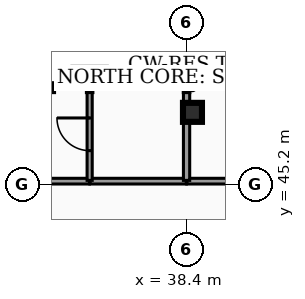
"""IFC4 building model, lengths in metres.
Left out: names, types, materials, properties, quantities, classifications, styles, units other than length and angle.
Written with IfcOpenShell. Run it as: python <this file> out.ifc"""

import sys

from ifc_helpers import new_model, si_unit, direction, frame, frame_2d, origin, origin_2d, place, context, subcontext, project, spatial, rectangle, hollow_rectangle, extrude, element, fill, save


model = new_model("IFC4")
c1 = context("Model", 3, precision=1e-05, world=origin(), true_north=direction((0.0, 1.0)))
c2 = subcontext(c1, "Body", "Model", "MODEL_VIEW")
j1 = project(units=[si_unit("LENGTHUNIT", "METRE"), si_unit("PLANEANGLEUNIT", "RADIAN")], contexts=[c1])
p1 = place(None, origin())
s1 = spatial("IfcSite", under=j1, at=p1, CompositionType="ELEMENT")
p2 = place(p1, origin())
s2 = spatial("IfcBuilding", under=s1, at=p2, CompositionType="ELEMENT")
p3 = place(p2, frame((0.0, 0.0, 272.0)))
s3 = spatial("IfcBuildingStorey", under=s2, at=p3, CompositionType="ELEMENT", Elevation=272.0)
p4 = place(p3, frame((38.555, 47.1, 0.0), z_axis=(0.0, 0.0, 1.0), x_axis=(1.0, 0.0, 0.0)))
e1 = element("IfcColumn", 1, at=p4, inside=s3, PredefinedType="COLUMN", context=c2, shape_type="SweptSolid", body=[
    extrude(hollow_rectangle(XDim=0.5, YDim=0.5, WallThickness=0.025, at=origin_2d()), origin(), (0.0, 0.0, 1.0), 3.18),
])
p5 = place(p3, frame((26.57, 45.29, 0.0), z_axis=(0.0, 0.0, 1.0), x_axis=(1.0, 0.0, 0.0)))
e2 = element("IfcWall", 2, at=p5, inside=s3, PredefinedType="PARTITIONING", context=c2, shape_type="SweptSolid", body=[
    extrude(rectangle(XDim=9.275, YDim=0.15, at=frame_2d((4.637, 0.0))), origin(), (0.0, 0.0, 1.0), 2.235),
])
for number, where, z_axis, x_axis in (
    (3, (35.855, 45.29, 0.0), (0.0, 0.0, 1.0), (1.0, 0.0, 0.0)),
    (4, (38.405, 45.29, 0.0), (0.0, 0.0, 1.0), (1.0, 0.0, 0.0)),
):
    element("IfcWall", number, at=place(p3, frame(where, z_axis=z_axis, x_axis=x_axis)), inside=s3, PredefinedType="PARTITIONING", context=c2, shape_type="SweptSolid", body=[
        extrude(rectangle(XDim=2.54, YDim=0.15, at=frame_2d((1.27, 0.0))), origin(), (0.0, 0.0, 1.0), 2.235),
    ])
p6 = place(p3, frame((35.85, 45.31, 0.0), z_axis=(0.0, 0.0, 1.0), x_axis=(0.0, 1.0, 0.0)))
e5 = element("IfcWall", 5, at=p6, inside=s3, PredefinedType="PARTITIONING", context=c2, shape_type="SweptSolid", body=[
    extrude(rectangle(XDim=2.425, YDim=0.135, at=frame_2d((1.212, 0.0))), origin(), (0.0, 0.0, 1.0), 2.235),
])
p7 = place(p6, frame((0.782, 0.0, 0.0)))
e6 = element("IfcOpeningElement", 6, at=p7, cuts=e5, PredefinedType="OPENING", context=c2, shape_type="SweptSolid", body=[
    extrude(rectangle(XDim=0.86, YDim=2.05, at=frame_2d((0.43, 1.025))), frame((0.0, 0.077, 0.0), z_axis=(0.0, -1.0, 0.0), x_axis=(1.0, 0.0, 0.0)), (0.0, 0.0, 1.0), 0.155),
])
p8 = place(p3, frame((38.4, 45.31, 0.0), z_axis=(0.0, 0.0, 1.0), x_axis=(0.0, 1.0, 0.0)))
e7 = element("IfcWall", 7, at=p8, inside=s3, PredefinedType="PARTITIONING", context=c2, shape_type="SweptSolid", body=[
    extrude(rectangle(XDim=2.425, YDim=0.165, at=frame_2d((1.212, 0.0))), origin(), (0.0, 0.0, 1.0), 2.235),
])
p9 = place(p7, origin())
e8 = element("IfcDoor", 8, at=p9, inside=s3, OperationType="SINGLE_SWING_RIGHT", PredefinedType="DOOR", context=c2, shape_type="SweptSolid", body=[
    extrude(rectangle(XDim=0.86, YDim=2.05, at=frame_2d((0.43, 1.025))), frame((0.0, 0.025, 0.0), z_axis=(0.0, -1.0, 0.0), x_axis=(1.0, 0.0, 0.0)), (0.0, 0.0, 1.0), 0.05),
])
fill(e6, e8)
save(model, sys.argv[1])
